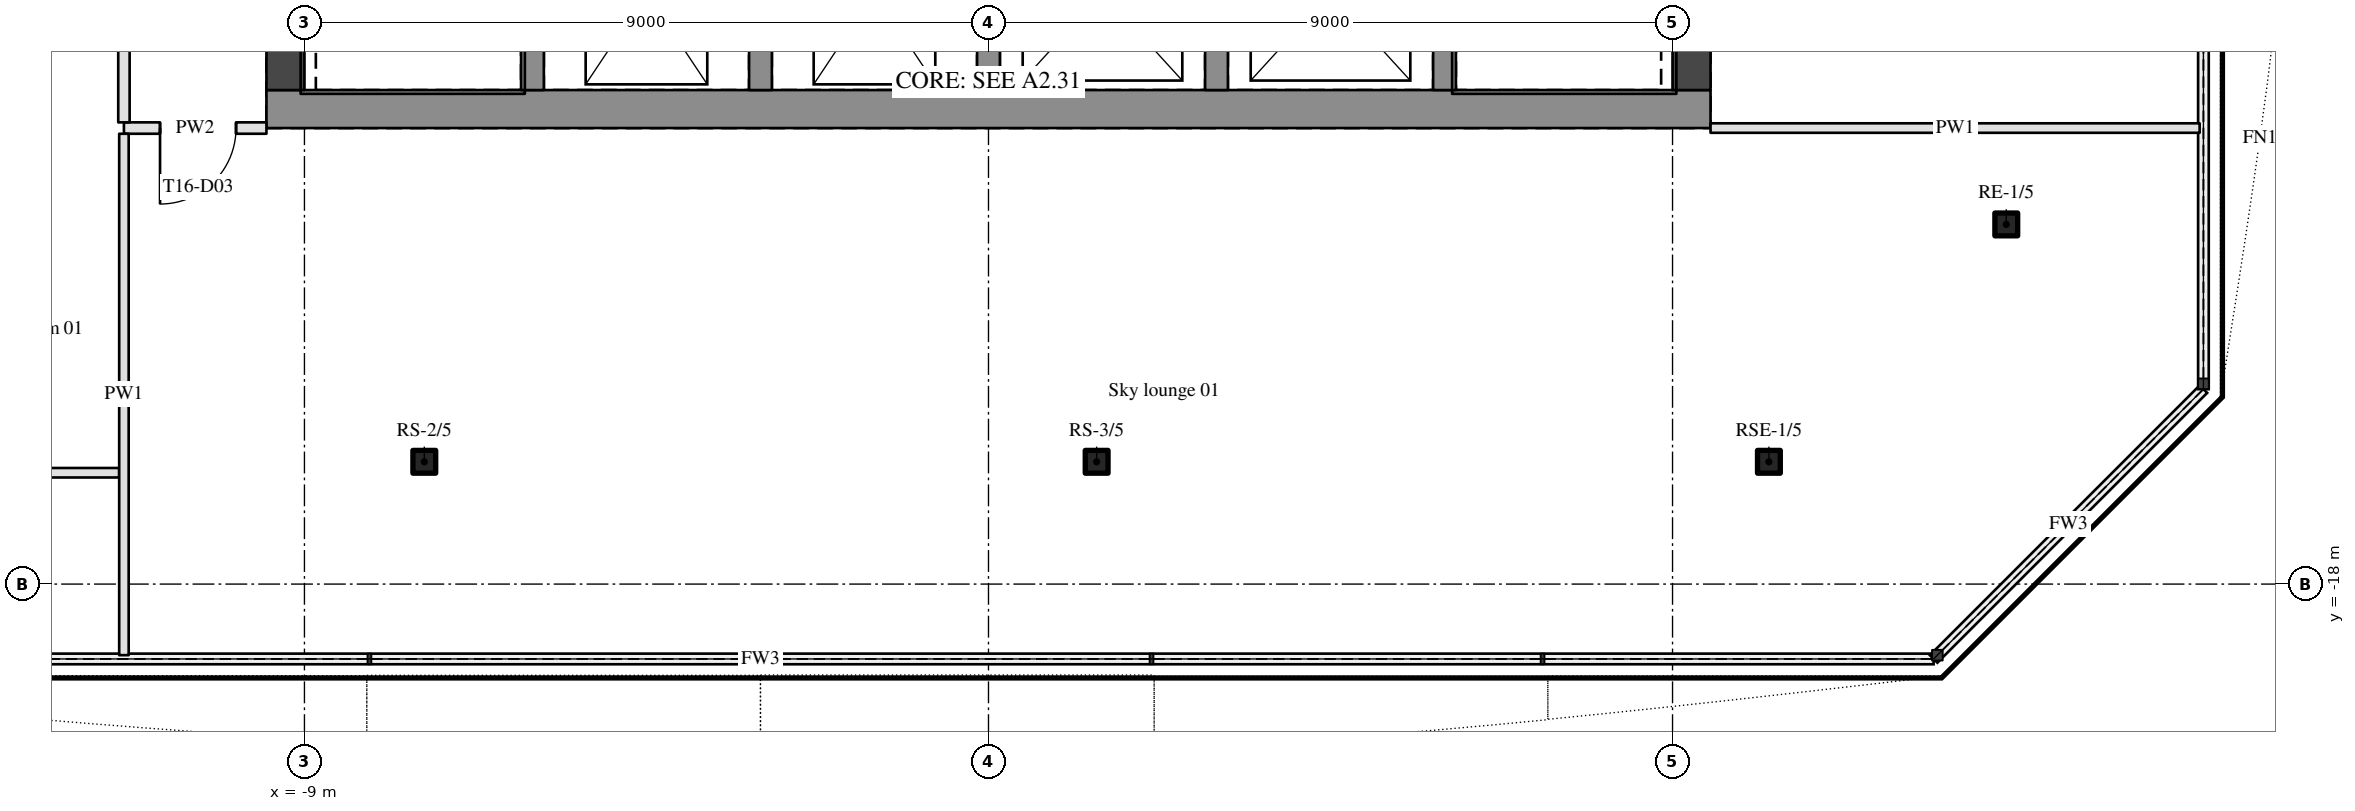
"""IFC4 building model, lengths in metres.
Left out: names, types, materials, properties, quantities, classifications, styles, units other than length and angle.
Written with IfcOpenShell. Run it as: python <this file> out.ifc"""

import sys

from ifc_helpers import new_model, si_unit, direction, frame, frame_2d, origin, origin_2d, place, context, subcontext, project, spatial, rectangle, hollow_rectangle, extrude, element, fill, save


model = new_model("IFC4")
c1 = context("Model", 3, precision=1e-05, world=origin(), true_north=direction((0.0, 1.0)))
c2 = subcontext(c1, "Body", "Model", "MODEL_VIEW")
j1 = project(units=[si_unit("LENGTHUNIT", "METRE"), si_unit("PLANEANGLEUNIT", "RADIAN")], contexts=[c1])
p1 = place(None, origin())
s1 = spatial("IfcSite", under=j1, at=p1, CompositionType="ELEMENT")
p2 = place(p1, origin())
s2 = spatial("IfcBuilding", under=s1, at=p2, CompositionType="ELEMENT")
p3 = place(p2, frame((0.0, 0.0, 217.2)))
s3 = spatial("IfcBuildingStorey", under=s2, at=p3, CompositionType="ELEMENT", Elevation=217.2)
for number, where, z_axis, x_axis in (
    (1, (-7.423, -16.391, 0.0), (0.0, 0.0, 1.0), (1.0, 0.0, 0.0)),
    (2, (1.423, -16.391, 0.0), (0.0, 0.0, 1.0), (1.0, 0.0, 0.0)),
    (3, (10.268, -16.391, 0.0), (0.0, 0.0, 1.0), (1.0, 0.0, 0.0)),
    (4, (13.391, -13.268, 0.0), (0.0, 0.0, 1.0), (1.0, 0.0, 0.0)),
):
    element("IfcColumn", number, at=place(p3, frame(where, z_axis=z_axis, x_axis=x_axis)), inside=s3, PredefinedType="COLUMN", context=c2, shape_type="SweptSolid", body=[
        extrude(hollow_rectangle(XDim=0.3, YDim=0.3, WallThickness=0.02, InnerFilletRadius=0.03, OuterFilletRadius=0.05, at=origin_2d()), origin(), (0.0, 0.0, 1.0), 3.15),
    ])
p4 = place(p3, frame((-9.5, -11.75, 0.0), z_axis=(0.0, 0.0, 1.0), x_axis=(1.0, 0.0, 0.0)))
e5 = element("IfcWall", 5, at=p4, inside=s3, PredefinedType="SHEAR", context=c2, shape_type="SweptSolid", body=[
    extrude(rectangle(XDim=19.0, YDim=0.5, at=frame_2d((9.5, 0.0))), origin(), (0.0, 0.0, 1.0), 3.15),
])
p5 = place(p3, frame((-9.25, -11.5, 0.0), z_axis=(0.0, 0.0, 1.0), x_axis=(0.0, 1.0, 0.0)))
e6 = element("IfcWall", 6, at=p5, inside=s3, PredefinedType="SHEAR", context=c2, shape_type="SweptSolid", body=[
    extrude(rectangle(XDim=11.65, YDim=0.5, at=frame_2d((5.825, 0.0))), origin(), (0.0, 0.0, 1.0), 3.15),
])
p6 = place(p5, frame((9.4, 0.0, 0.0)))
e7 = element("IfcOpeningElement", 7, at=p6, cuts=e6, PredefinedType="OPENING", context=c2, shape_type="SweptSolid", body=[
    extrude(rectangle(XDim=1.8, YDim=2.1, at=frame_2d((0.9, 1.05))), frame((0.0, 0.26, 0.0), z_axis=(0.0, -1.0, 0.0), x_axis=(1.0, 0.0, 0.0)), (0.0, 0.0, 1.0), 0.52),
])
p7 = place(p3, frame((9.25, -11.5, 0.0), z_axis=(0.0, 0.0, 1.0), x_axis=(0.0, 1.0, 0.0)))
e8 = element("IfcWall", 8, at=p7, inside=s3, PredefinedType="SHEAR", context=c2, shape_type="SweptSolid", body=[
    extrude(rectangle(XDim=11.65, YDim=0.5, at=frame_2d((5.825, 0.0))), origin(), (0.0, 0.0, 1.0), 3.15),
])
p8 = place(p3, frame((-11.438, -16.535, 0.0), z_axis=(0.0, 0.0, 1.0), x_axis=(-1.0, 0.0, 0.0)))
e9 = element("IfcWall", 9, at=p8, inside=s3, PredefinedType="PARTITIONING", context=c2, shape_type="SweptSolid", body=[
    extrude(rectangle(XDim=3.137, YDim=0.125, at=frame_2d((1.569, 0.0))), origin(), (0.0, 0.0, 1.0), 2.21),
])
p9 = place(p8, frame((1.087, 0.0, 0.0)))
e10 = element("IfcOpeningElement", 10, at=p9, cuts=e9, PredefinedType="OPENING", context=c2, shape_type="SweptSolid", body=[
    extrude(rectangle(XDim=0.9, YDim=2.1, at=frame_2d((0.45, 1.05))), frame((0.0, 0.073, 0.0), z_axis=(0.0, -1.0, 0.0), x_axis=(1.0, 0.0, 0.0)), (0.0, 0.0, 1.0), 0.145),
])
p10 = place(p3, frame((-9.5, -12.0, 0.0), z_axis=(0.0, 0.0, 1.0), x_axis=(-1.0, 0.0, 0.0)))
e11 = element("IfcWall", 11, at=p10, inside=s3, PredefinedType="PARTITIONING", context=c2, shape_type="SweptSolid", body=[
    extrude(rectangle(XDim=1.875, YDim=0.15, at=frame_2d((0.938, 0.0))), origin(), (0.0, 0.0, 1.0), 2.21),
])
p11 = place(p10, frame((0.4, 0.0, 0.0)))
e12 = element("IfcOpeningElement", 12, at=p11, cuts=e11, PredefinedType="OPENING", context=c2, shape_type="SweptSolid", body=[
    extrude(rectangle(XDim=1.0, YDim=2.1, at=frame_2d((0.5, 1.05))), frame((0.0, 0.085, 0.0), z_axis=(0.0, -1.0, 0.0), x_axis=(1.0, 0.0, 0.0)), (0.0, 0.0, 1.0), 0.17),
])
p12 = place(p3, frame((9.5, -12.0, 0.0), z_axis=(0.0, 0.0, 1.0), x_axis=(1.0, 0.0, 0.0)))
e13 = element("IfcWall", 13, at=p12, inside=s3, PredefinedType="PARTITIONING", context=c2, shape_type="SweptSolid", body=[
    extrude(rectangle(XDim=6.435, YDim=0.125, at=frame_2d((3.218, 0.0))), origin(), (0.0, 0.0, 1.0), 2.21),
])
p13 = place(p3, frame((-11.375, -18.935, 0.0), z_axis=(0.0, 0.0, 1.0), x_axis=(0.0, 1.0, 0.0)))
e14 = element("IfcWall", 14, at=p13, inside=s3, PredefinedType="PARTITIONING", context=c2, shape_type="SweptSolid", body=[
    extrude(rectangle(XDim=6.86, YDim=0.125, at=frame_2d((3.43, 0.0))), origin(), (0.0, 0.0, 1.0), 2.21),
])
p14 = place(p3, frame((-11.375, -11.925, 0.0), z_axis=(0.0, 0.0, 1.0), x_axis=(0.0, 1.0, 0.0)))
e15 = element("IfcWall", 15, at=p14, inside=s3, PredefinedType="PARTITIONING", context=c2, shape_type="SweptSolid", body=[
    extrude(rectangle(XDim=23.25, YDim=0.15, at=frame_2d((11.625, 0.0))), origin(), (0.0, 0.0, 1.0), 2.21),
])
p15 = place(p14, frame((1.155, 0.0, 0.0)))
e16 = element("IfcOpeningElement", 16, at=p15, cuts=e15, PredefinedType="OPENING", context=c2, shape_type="SweptSolid", body=[
    extrude(rectangle(XDim=1.0, YDim=2.1, at=frame_2d((0.5, 1.05))), frame((0.0, 0.085, 0.0), z_axis=(0.0, -1.0, 0.0), x_axis=(1.0, 0.0, 0.0)), (0.0, 0.0, 1.0), 0.17),
])
p16 = place(p14, frame((12.92, 0.0, 0.0)))
e17 = element("IfcOpeningElement", 17, at=p16, cuts=e15, PredefinedType="OPENING", context=c2, shape_type="SweptSolid", body=[
    extrude(rectangle(XDim=1.0, YDim=2.1, at=frame_2d((0.5, 1.05))), frame((0.0, 0.085, 0.0), z_axis=(0.0, -1.0, 0.0), x_axis=(1.0, 0.0, 0.0)), (0.0, 0.0, 1.0), 0.17),
])
p17 = place(p14, frame((21.875, 0.0, 0.0)))
e18 = element("IfcOpeningElement", 18, at=p17, cuts=e15, PredefinedType="OPENING", context=c2, shape_type="SweptSolid", body=[
    extrude(rectangle(XDim=1.0, YDim=2.1, at=frame_2d((0.5, 1.05))), frame((0.0, 0.085, 0.0), z_axis=(0.0, -1.0, 0.0), x_axis=(1.0, 0.0, 0.0)), (0.0, 0.0, 1.0), 0.17),
])
p18 = place(p3, frame((-6.0, -11.5, 0.0), z_axis=(0.0, 0.0, 1.0), x_axis=(0.0, 1.0, 0.0)))
e19 = element("IfcWall", 19, at=p18, inside=s3, PredefinedType="SHEAR", context=c2, shape_type="SweptSolid", body=[
    extrude(rectangle(XDim=6.4, YDim=0.3, at=frame_2d((3.2, 0.0))), origin(), (0.0, 0.0, 1.0), 3.15),
])
p19 = place(p18, frame((5.15, 0.0, 0.0)))
e20 = element("IfcOpeningElement", 20, at=p19, cuts=e19, PredefinedType="OPENING", context=c2, shape_type="SweptSolid", body=[
    extrude(rectangle(XDim=1.1, YDim=2.1, at=frame_2d((0.55, 1.05))), frame((0.0, 0.16, 0.0), z_axis=(0.0, -1.0, 0.0), x_axis=(1.0, 0.0, 0.0)), (0.0, 0.0, 1.0), 0.32),
])
for number, where, z_axis, x_axis in (
    (21, (-3.0, -11.5, 0.0), (0.0, 0.0, 1.0), (0.0, 1.0, 0.0)),
    (22, (0.0, -11.5, 0.0), (0.0, 0.0, 1.0), (0.0, 1.0, 0.0)),
    (23, (3.0, -11.5, 0.0), (0.0, 0.0, 1.0), (0.0, 1.0, 0.0)),
):
    element("IfcWall", number, at=place(p3, frame(where, z_axis=z_axis, x_axis=x_axis)), inside=s3, PredefinedType="SHEAR", context=c2, shape_type="SweptSolid", body=[
        extrude(rectangle(XDim=2.4, YDim=0.3, at=frame_2d((1.2, 0.0))), origin(), (0.0, 0.0, 1.0), 3.15),
    ])
p20 = place(p3, frame((6.0, -5.1, 0.0), z_axis=(0.0, 0.0, 1.0), x_axis=(0.0, -1.0, 0.0)))
e24 = element("IfcWall", 24, at=p20, inside=s3, PredefinedType="SHEAR", context=c2, shape_type="SweptSolid", body=[
    extrude(rectangle(XDim=6.4, YDim=0.3, at=frame_2d((3.2, 0.0))), origin(), (0.0, 0.0, 1.0), 3.15),
])
p21 = place(p20, frame((0.15, 0.0, 0.0)))
e25 = element("IfcOpeningElement", 25, at=p21, cuts=e24, PredefinedType="OPENING", context=c2, shape_type="SweptSolid", body=[
    extrude(rectangle(XDim=1.1, YDim=2.1, at=frame_2d((0.55, 1.05))), frame((0.0, 0.16, 0.0), z_axis=(0.0, -1.0, 0.0), x_axis=(1.0, 0.0, 0.0)), (0.0, 0.0, 1.0), 0.32),
])
p22 = place(p11, origin())
e26 = element("IfcDoor", 26, at=p22, inside=s3, OperationType="SINGLE_SWING_RIGHT", PredefinedType="DOOR", context=c2, shape_type="SweptSolid", body=[
    extrude(rectangle(XDim=1.0, YDim=2.1, at=frame_2d((0.5, 1.05))), frame((0.0, 0.025, 0.0), z_axis=(0.0, -1.0, 0.0), x_axis=(1.0, 0.0, 0.0)), (0.0, 0.0, 1.0), 0.05),
])
fill(e12, e26)
save(model, sys.argv[1])
